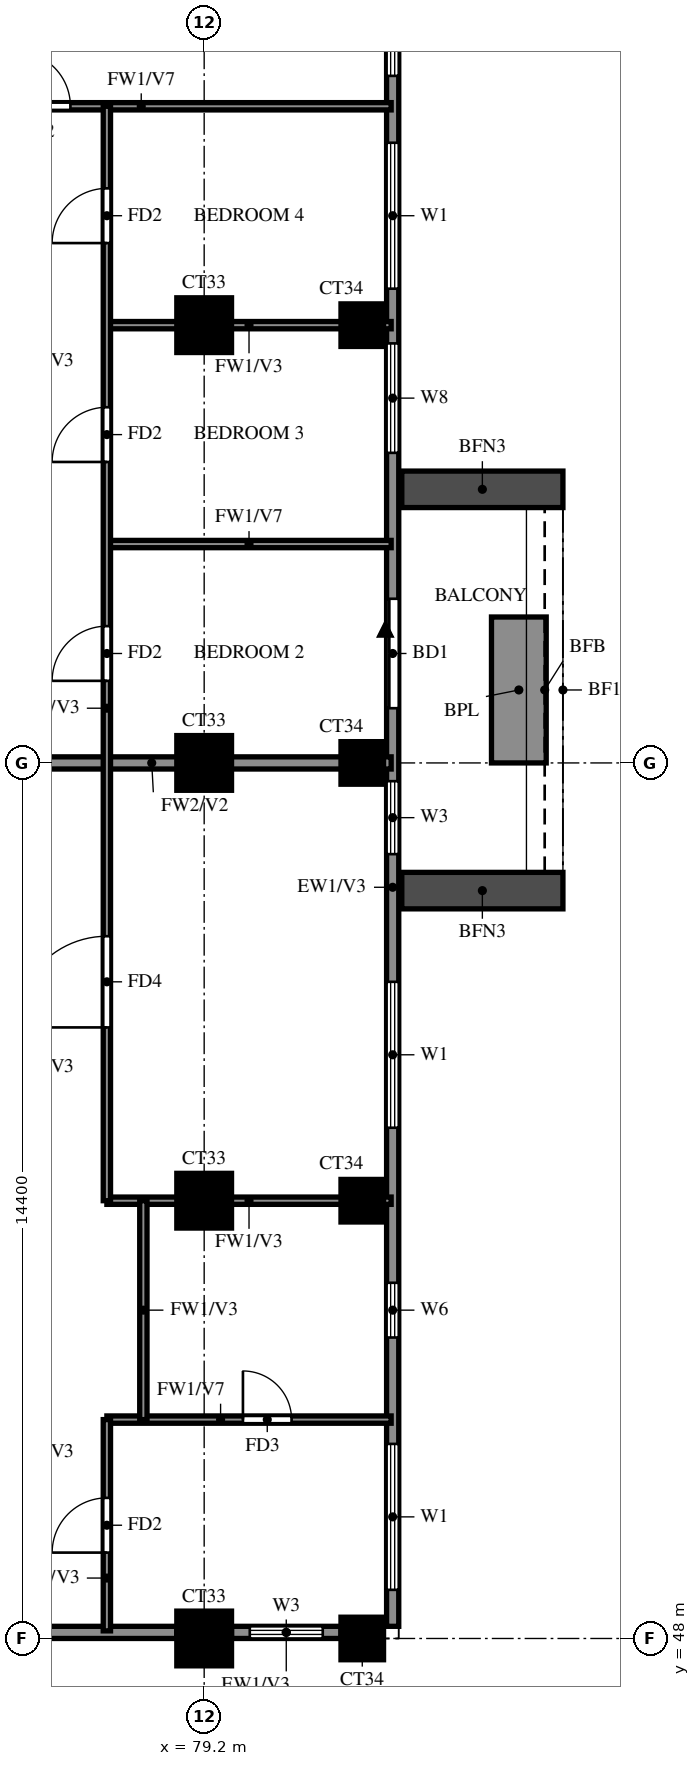
"""IFC4 building model, lengths in metres.
Left out: names, types, materials, properties, quantities, classifications, styles, units other than length and angle.
Written with IfcOpenShell. Run it as: python <this file> out.ifc"""

import sys

from ifc_helpers import new_model, si_unit, direction, frame, frame_2d, origin, origin_2d, place, context, subcontext, project, spatial, rectangle, extrude, source, transform, mapped, element, fill, save


model = new_model("IFC4")
c1 = context("Model", 3, precision=1e-05, world=origin(), true_north=direction((0.0, 1.0)))
c2 = subcontext(c1, "Body", "Model", "MODEL_VIEW")
j1 = project(units=[si_unit("LENGTHUNIT", "METRE"), si_unit("PLANEANGLEUNIT", "RADIAN")], contexts=[c1])
p1 = place(None, origin())
s1 = spatial("IfcSite", under=j1, at=p1, CompositionType="ELEMENT")
p2 = place(p1, origin())
s2 = spatial("IfcBuilding", under=s1, at=p2, CompositionType="ELEMENT")
p3 = place(p2, frame((0.0, 0.0, 225.5)))
s3 = spatial("IfcBuildingStorey", under=s2, at=p3, CompositionType="ELEMENT", Elevation=225.5)
m1 = source(origin(), c2, "Body", "SweptSolid", [
    extrude(rectangle(XDim=0.9, YDim=0.9, at=origin_2d()), origin(), (0.0, 0.0, 1.0), 3.22),
])
p4 = place(p3, frame((79.2, 48.0, 0.0), z_axis=(0.0, 0.0, 1.0), x_axis=(1.0, 0.0, 0.0)))
e1 = element("IfcColumn", 1, at=p4, inside=s3, PredefinedType="COLUMN", context=c2, shape_type="MappedRepresentation", body=[
    mapped(m1, transform((0.0, 0.0, 0.0))),
])
m2 = source(origin(), c2, "Body", "SweptSolid", [
    extrude(rectangle(XDim=0.7, YDim=0.7, at=origin_2d()), origin(), (0.0, 0.0, 1.0), 3.22),
])
p5 = place(p3, frame((81.8, 48.0, 0.0), z_axis=(0.0, 0.0, 1.0), x_axis=(1.0, 0.0, 0.0)))
e2 = element("IfcColumn", 2, at=p5, inside=s3, PredefinedType="COLUMN", context=c2, shape_type="MappedRepresentation", body=[
    mapped(m2, transform((0.0, 0.0, 0.0))),
])
p6 = place(p3, frame((79.2, 55.2, 0.0), z_axis=(0.0, 0.0, 1.0), x_axis=(1.0, 0.0, 0.0)))
e3 = element("IfcColumn", 3, at=p6, inside=s3, PredefinedType="COLUMN", context=c2, shape_type="MappedRepresentation", body=[
    mapped(m1, transform((0.0, 0.0, 0.0))),
])
p7 = place(p3, frame((81.8, 55.2, 0.0), z_axis=(0.0, 0.0, 1.0), x_axis=(1.0, 0.0, 0.0)))
e4 = element("IfcColumn", 4, at=p7, inside=s3, PredefinedType="COLUMN", context=c2, shape_type="MappedRepresentation", body=[
    mapped(m2, transform((0.0, 0.0, 0.0))),
])
p8 = place(p3, frame((79.2, 62.4, 0.0), z_axis=(0.0, 0.0, 1.0), x_axis=(1.0, 0.0, 0.0)))
e5 = element("IfcColumn", 5, at=p8, inside=s3, PredefinedType="COLUMN", context=c2, shape_type="MappedRepresentation", body=[
    mapped(m1, transform((0.0, 0.0, 0.0))),
])
p9 = place(p3, frame((81.8, 62.4, 0.0), z_axis=(0.0, 0.0, 1.0), x_axis=(1.0, 0.0, 0.0)))
e6 = element("IfcColumn", 6, at=p9, inside=s3, PredefinedType="COLUMN", context=c2, shape_type="MappedRepresentation", body=[
    mapped(m2, transform((0.0, 0.0, 0.0))),
])
p10 = place(p3, frame((79.2, 69.6, 0.0), z_axis=(0.0, 0.0, 1.0), x_axis=(1.0, 0.0, 0.0)))
e7 = element("IfcColumn", 7, at=p10, inside=s3, PredefinedType="COLUMN", context=c2, shape_type="MappedRepresentation", body=[
    mapped(m1, transform((0.0, 0.0, 0.0))),
])
p11 = place(p3, frame((81.8, 69.6, 0.0), z_axis=(0.0, 0.0, 1.0), x_axis=(1.0, 0.0, 0.0)))
e8 = element("IfcColumn", 8, at=p11, inside=s3, PredefinedType="COLUMN", context=c2, shape_type="MappedRepresentation", body=[
    mapped(m2, transform((0.0, 0.0, 0.0))),
])
p12 = place(p3, frame((81.907, 39.87, 0.0), z_axis=(0.0, 0.0, 1.0), x_axis=(-0.777936274417, 0.62834318087, 0.0)))
e9 = element("IfcWall", 9, at=p12, inside=s3, PredefinedType="SOLIDWALL", context=c2, shape_type="SweptSolid", body=[
    extrude(rectangle(XDim=13.099, YDim=0.2, at=frame_2d((6.549, 0.0))), origin(), (0.0, 0.0, 1.0), 3.22),
])
p13 = place(p12, frame((9.938, 0.0, 1.5)))
e10 = element("IfcOpeningElement", 10, at=p13, cuts=e9, PredefinedType="OPENING", context=c2, shape_type="SweptSolid", body=[
    extrude(rectangle(XDim=0.9, YDim=0.9, at=frame_2d((0.45, 0.45))), frame((0.0, 0.11, 0.0), z_axis=(0.0, -1.0, 0.0), x_axis=(1.0, 0.0, 0.0)), (0.0, 0.0, 1.0), 0.22),
])
p14 = place(p3, frame((71.987, 48.1, 0.0), z_axis=(0.0, 0.0, 1.0), x_axis=(1.0, 0.0, 0.0)))
e11 = element("IfcWall", 11, at=p14, inside=s3, PredefinedType="SOLIDWALL", context=c2, shape_type="SweptSolid", body=[
    extrude(rectangle(XDim=6.763, YDim=0.2, at=frame_2d((3.381, 0.0))), origin(), (0.0, 0.0, 1.0), 3.22),
])
p15 = place(p14, frame((1.406, 0.0, 1.5)))
e12 = element("IfcOpeningElement", 12, at=p15, cuts=e11, PredefinedType="OPENING", context=c2, shape_type="SweptSolid", body=[
    extrude(rectangle(XDim=0.9, YDim=0.9, at=frame_2d((0.45, 0.45))), frame((0.0, 0.11, 0.0), z_axis=(0.0, -1.0, 0.0), x_axis=(1.0, 0.0, 0.0)), (0.0, 0.0, 1.0), 0.22),
])
p16 = place(p3, frame((79.65, 48.1, 0.0), z_axis=(0.0, 0.0, 1.0), x_axis=(1.0, 0.0, 0.0)))
e13 = element("IfcWall", 13, at=p16, inside=s3, PredefinedType="SOLIDWALL", context=c2, shape_type="SweptSolid", body=[
    extrude(rectangle(XDim=1.8, YDim=0.2, at=frame_2d((0.9, 0.0))), origin(), (0.0, 0.0, 1.0), 3.22),
])
p17 = place(p16, frame((0.3, 0.0, 0.6)))
e14 = element("IfcOpeningElement", 14, at=p17, cuts=e13, PredefinedType="OPENING", context=c2, shape_type="SweptSolid", body=[
    extrude(rectangle(XDim=1.2, YDim=2.4, at=frame_2d((0.6, 1.2))), frame((0.0, 0.11, 0.0), z_axis=(0.0, -1.0, 0.0), x_axis=(1.0, 0.0, 0.0)), (0.0, 0.0, 1.0), 0.22),
])
p18 = place(p3, frame((82.3, 48.2, 0.0), z_axis=(0.0, 0.0, 1.0), x_axis=(0.0, 1.0, 0.0)))
e15 = element("IfcWall", 15, at=p18, inside=s3, PredefinedType="SOLIDWALL", context=c2, shape_type="SweptSolid", body=[
    extrude(rectangle(XDim=28.6, YDim=0.2, at=frame_2d((14.3, 0.0))), origin(), (0.0, 0.0, 1.0), 3.22),
])
p19 = place(p18, frame((15.1, 0.0, 0.0)))
e16 = element("IfcOpeningElement", 16, at=p19, cuts=e15, PredefinedType="OPENING", context=c2, shape_type="SweptSolid", body=[
    extrude(rectangle(XDim=1.8, YDim=2.4, at=frame_2d((0.9, 1.2))), frame((0.0, 0.11, 0.0), z_axis=(0.0, -1.0, 0.0), x_axis=(1.0, 0.0, 0.0)), (0.0, 0.0, 1.0), 0.22),
])
p20 = place(p18, frame((0.6, 0.0, 0.6)))
e17 = element("IfcOpeningElement", 17, at=p20, cuts=e15, PredefinedType="OPENING", context=c2, shape_type="SweptSolid", body=[
    extrude(rectangle(XDim=2.4, YDim=2.4, at=frame_2d((1.2, 1.2))), frame((0.0, 0.11, 0.0), z_axis=(0.0, -1.0, 0.0), x_axis=(1.0, 0.0, 0.0)), (0.0, 0.0, 1.0), 0.22),
])
p21 = place(p18, frame((4.75, 0.0, 1.5)))
e18 = element("IfcOpeningElement", 18, at=p21, cuts=e15, PredefinedType="OPENING", context=c2, shape_type="SweptSolid", body=[
    extrude(rectangle(XDim=0.9, YDim=0.9, at=frame_2d((0.45, 0.45))), frame((0.0, 0.11, 0.0), z_axis=(0.0, -1.0, 0.0), x_axis=(1.0, 0.0, 0.0)), (0.0, 0.0, 1.0), 0.22),
])
p22 = place(p18, frame((8.2, 0.0, 0.6)))
e19 = element("IfcOpeningElement", 19, at=p22, cuts=e15, PredefinedType="OPENING", context=c2, shape_type="SweptSolid", body=[
    extrude(rectangle(XDim=2.4, YDim=2.4, at=frame_2d((1.2, 1.2))), frame((0.0, 0.11, 0.0), z_axis=(0.0, -1.0, 0.0), x_axis=(1.0, 0.0, 0.0)), (0.0, 0.0, 1.0), 0.22),
])
p23 = place(p18, frame((12.7, 0.0, 0.6)))
e20 = element("IfcOpeningElement", 20, at=p23, cuts=e15, PredefinedType="OPENING", context=c2, shape_type="SweptSolid", body=[
    extrude(rectangle(XDim=1.2, YDim=2.4, at=frame_2d((0.6, 1.2))), frame((0.0, 0.11, 0.0), z_axis=(0.0, -1.0, 0.0), x_axis=(1.0, 0.0, 0.0)), (0.0, 0.0, 1.0), 0.22),
])
p24 = place(p18, frame((19.3, 0.0, 0.6)))
e21 = element("IfcOpeningElement", 21, at=p24, cuts=e15, PredefinedType="OPENING", context=c2, shape_type="SweptSolid", body=[
    extrude(rectangle(XDim=1.8, YDim=2.4, at=frame_2d((0.9, 1.2))), frame((0.0, 0.11, 0.0), z_axis=(0.0, -1.0, 0.0), x_axis=(1.0, 0.0, 0.0)), (0.0, 0.0, 1.0), 0.22),
])
p25 = place(p18, frame((22.0, 0.0, 0.6)))
e22 = element("IfcOpeningElement", 22, at=p25, cuts=e15, PredefinedType="OPENING", context=c2, shape_type="SweptSolid", body=[
    extrude(rectangle(XDim=2.4, YDim=2.4, at=frame_2d((1.2, 1.2))), frame((0.0, 0.11, 0.0), z_axis=(0.0, -1.0, 0.0), x_axis=(1.0, 0.0, 0.0)), (0.0, 0.0, 1.0), 0.22),
])
p26 = place(p18, frame((25.5, 0.0, 0.6)))
e23 = element("IfcOpeningElement", 23, at=p26, cuts=e15, PredefinedType="OPENING", context=c2, shape_type="SweptSolid", body=[
    extrude(rectangle(XDim=2.4, YDim=2.4, at=frame_2d((1.2, 1.2))), frame((0.0, 0.11, 0.0), z_axis=(0.0, -1.0, 0.0), x_axis=(1.0, 0.0, 0.0)), (0.0, 0.0, 1.0), 0.22),
])
for number, where, z_axis, x_axis in (
    (24, (82.45, 60.3, 0.0), (0.0, 0.0, 1.0), (1.0, 0.0, 0.0)),
    (25, (82.45, 66.9, 0.0), (0.0, 0.0, 1.0), (1.0, 0.0, 0.0)),
):
    element("IfcWall", number, at=place(p3, frame(where, z_axis=z_axis, x_axis=x_axis)), inside=s3, PredefinedType="SOLIDWALL", context=c2, shape_type="SweptSolid", body=[
        extrude(rectangle(XDim=2.65, YDim=0.6, at=frame_2d((1.325, 0.0))), origin(), (0.0, 0.0, 1.0), 2.85),
    ])
p27 = place(p3, frame((84.375, 62.4, 0.0), z_axis=(0.0, 0.0, 1.0), x_axis=(0.0, 1.0, 0.0)))
e26 = element("IfcWall", 26, at=p27, inside=s3, PredefinedType="SOLIDWALL", context=c2, shape_type="SweptSolid", body=[
    extrude(rectangle(XDim=2.4, YDim=0.9, at=frame_2d((1.2, 0.0))), origin(), (0.0, 0.0, 1.0), 0.9),
])
p28 = place(p3, frame((74.4, 62.4, 0.0), z_axis=(0.0, 0.0, 1.0), x_axis=(1.0, 0.0, 0.0)))
e27 = element("IfcWall", 27, at=p28, inside=s3, PredefinedType="SOLIDWALL", context=c2, shape_type="SweptSolid", body=[
    extrude(rectangle(XDim=7.875, YDim=0.2, at=frame_2d((3.938, 0.0))), origin(), (0.0, 0.0, 1.0), 3.22),
])
p29 = place(p3, frame((77.6, 51.6, 0.0), z_axis=(0.0, 0.0, 1.0), x_axis=(1.0, 0.0, 0.0)))
e28 = element("IfcWall", 28, at=p29, inside=s3, PredefinedType="PARTITIONING", context=c2, shape_type="SweptSolid", body=[
    extrude(rectangle(XDim=4.675, YDim=0.12, at=frame_2d((2.337, 0.0))), origin(), (0.0, 0.0, 1.0), 2.32),
])
p30 = place(p29, frame((2.238, 0.0, 0.0)))
e29 = element("IfcOpeningElement", 29, at=p30, cuts=e28, PredefinedType="OPENING", context=c2, shape_type="SweptSolid", body=[
    extrude(rectangle(XDim=0.8, YDim=2.1, at=frame_2d((0.4, 1.05))), frame((0.0, 0.07, 0.0), z_axis=(0.0, -1.0, 0.0), x_axis=(1.0, 0.0, 0.0)), (0.0, 0.0, 1.0), 0.14),
])
p31 = place(p3, frame((77.6, 55.2, 0.0), z_axis=(0.0, 0.0, 1.0), x_axis=(1.0, 0.0, 0.0)))
e30 = element("IfcWall", 30, at=p31, inside=s3, PredefinedType="PARTITIONING", context=c2, shape_type="SweptSolid", body=[
    extrude(rectangle(XDim=4.675, YDim=0.12, at=frame_2d((2.337, 0.0))), origin(), (0.0, 0.0, 1.0), 3.22),
])
p32 = place(p3, frame((77.6, 66.0, 0.0), z_axis=(0.0, 0.0, 1.0), x_axis=(1.0, 0.0, 0.0)))
e31 = element("IfcWall", 31, at=p32, inside=s3, PredefinedType="PARTITIONING", context=c2, shape_type="SweptSolid", body=[
    extrude(rectangle(XDim=4.675, YDim=0.12, at=frame_2d((2.337, 0.0))), origin(), (0.0, 0.0, 1.0), 2.32),
])
p33 = place(p3, frame((77.6, 69.6, 0.0), z_axis=(0.0, 0.0, 1.0), x_axis=(1.0, 0.0, 0.0)))
e32 = element("IfcWall", 32, at=p33, inside=s3, PredefinedType="PARTITIONING", context=c2, shape_type="SweptSolid", body=[
    extrude(rectangle(XDim=4.675, YDim=0.12, at=frame_2d((2.337, 0.0))), origin(), (0.0, 0.0, 1.0), 3.22),
])
p34 = place(p3, frame((72.0, 73.2, 0.0), z_axis=(0.0, 0.0, 1.0), x_axis=(1.0, 0.0, 0.0)))
e33 = element("IfcWall", 33, at=p34, inside=s3, PredefinedType="PARTITIONING", context=c2, shape_type="SweptSolid", body=[
    extrude(rectangle(XDim=10.275, YDim=0.12, at=frame_2d((5.137, 0.0))), origin(), (0.0, 0.0, 1.0), 2.32),
])
p35 = place(p34, frame((4.1, 0.0, 0.0)))
e34 = element("IfcOpeningElement", 34, at=p35, cuts=e33, PredefinedType="OPENING", context=c2, shape_type="SweptSolid", body=[
    extrude(rectangle(XDim=0.9, YDim=2.1, at=frame_2d((0.45, 1.05))), frame((0.0, 0.07, 0.0), z_axis=(0.0, -1.0, 0.0), x_axis=(1.0, 0.0, 0.0)), (0.0, 0.0, 1.0), 0.14),
])
p36 = place(p3, frame((77.6, 48.125, 0.0), z_axis=(0.0, 0.0, 1.0), x_axis=(0.0, 1.0, 0.0)))
e35 = element("IfcWall", 35, at=p36, inside=s3, PredefinedType="PARTITIONING", context=c2, shape_type="SweptSolid", body=[
    extrude(rectangle(XDim=3.475, YDim=0.12, at=frame_2d((1.738, 0.0))), origin(), (0.0, 0.0, 1.0), 3.22),
])
p37 = place(p36, frame((1.288, 0.0, 0.0)))
e36 = element("IfcOpeningElement", 36, at=p37, cuts=e35, PredefinedType="OPENING", context=c2, shape_type="SweptSolid", body=[
    extrude(rectangle(XDim=0.9, YDim=2.1, at=frame_2d((0.45, 1.05))), frame((0.0, 0.07, 0.0), z_axis=(0.0, -1.0, 0.0), x_axis=(1.0, 0.0, 0.0)), (0.0, 0.0, 1.0), 0.14),
])
p38 = place(p3, frame((77.6, 55.2, 0.0), z_axis=(0.0, 0.0, 1.0), x_axis=(0.0, 1.0, 0.0)))
e37 = element("IfcWall", 37, at=p38, inside=s3, PredefinedType="PARTITIONING", context=c2, shape_type="SweptSolid", body=[
    extrude(rectangle(XDim=18.0, YDim=0.12, at=frame_2d((9.0, 0.0))), origin(), (0.0, 0.0, 1.0), 3.22),
])
p39 = place(p38, frame((2.85, 0.0, 0.0)))
e38 = element("IfcOpeningElement", 38, at=p39, cuts=e37, PredefinedType="OPENING", context=c2, shape_type="SweptSolid", body=[
    extrude(rectangle(XDim=1.5, YDim=2.1, at=frame_2d((0.75, 1.05))), frame((0.0, 0.07, 0.0), z_axis=(0.0, -1.0, 0.0), x_axis=(1.0, 0.0, 0.0)), (0.0, 0.0, 1.0), 0.14),
])
p40 = place(p38, frame((8.55, 0.0, 0.0)))
e39 = element("IfcOpeningElement", 39, at=p40, cuts=e37, PredefinedType="OPENING", context=c2, shape_type="SweptSolid", body=[
    extrude(rectangle(XDim=0.9, YDim=2.1, at=frame_2d((0.45, 1.05))), frame((0.0, 0.07, 0.0), z_axis=(0.0, -1.0, 0.0), x_axis=(1.0, 0.0, 0.0)), (0.0, 0.0, 1.0), 0.14),
])
p41 = place(p38, frame((12.15, 0.0, 0.0)))
e40 = element("IfcOpeningElement", 40, at=p41, cuts=e37, PredefinedType="OPENING", context=c2, shape_type="SweptSolid", body=[
    extrude(rectangle(XDim=0.9, YDim=2.1, at=frame_2d((0.45, 1.05))), frame((0.0, 0.07, 0.0), z_axis=(0.0, -1.0, 0.0), x_axis=(1.0, 0.0, 0.0)), (0.0, 0.0, 1.0), 0.14),
])
p42 = place(p38, frame((15.75, 0.0, 0.0)))
e41 = element("IfcOpeningElement", 41, at=p42, cuts=e37, PredefinedType="OPENING", context=c2, shape_type="SweptSolid", body=[
    extrude(rectangle(XDim=0.9, YDim=2.1, at=frame_2d((0.45, 1.05))), frame((0.0, 0.07, 0.0), z_axis=(0.0, -1.0, 0.0), x_axis=(1.0, 0.0, 0.0)), (0.0, 0.0, 1.0), 0.14),
])
p43 = place(p3, frame((78.2, 51.6, 0.0), z_axis=(0.0, 0.0, 1.0), x_axis=(0.0, 1.0, 0.0)))
e42 = element("IfcWall", 42, at=p43, inside=s3, PredefinedType="PARTITIONING", context=c2, shape_type="SweptSolid", body=[
    extrude(rectangle(XDim=3.6, YDim=0.12, at=frame_2d((1.8, 0.0))), origin(), (0.0, 0.0, 1.0), 3.22),
])
p44 = place(p17, origin())
e43 = element("IfcWindow", 43, at=p44, inside=s3, PartitioningType="SINGLE_PANEL", PredefinedType="WINDOW", context=c2, shape_type="SweptSolid", body=[
    extrude(rectangle(XDim=1.2, YDim=2.4, at=frame_2d((0.6, 1.2))), frame((0.0, 0.03, 0.0), z_axis=(0.0, -1.0, 0.0), x_axis=(1.0, 0.0, 0.0)), (0.0, 0.0, 1.0), 0.06),
])
fill(e14, e43)
p45 = place(p19, origin())
e44 = element("IfcDoor", 44, at=p45, inside=s3, OperationType="DOUBLE_DOOR_SLIDING", PredefinedType="DOOR", context=c2, shape_type="SweptSolid", body=[
    extrude(rectangle(XDim=1.8, YDim=2.4, at=frame_2d((0.9, 1.2))), frame((0.0, 0.025, 0.0), z_axis=(0.0, -1.0, 0.0), x_axis=(1.0, 0.0, 0.0)), (0.0, 0.0, 1.0), 0.05),
])
fill(e16, e44)
p46 = place(p20, origin())
e45 = element("IfcWindow", 45, at=p46, inside=s3, PartitioningType="DOUBLE_PANEL_VERTICAL", PredefinedType="WINDOW", context=c2, shape_type="SweptSolid", body=[
    extrude(rectangle(XDim=2.4, YDim=2.4, at=frame_2d((1.2, 1.2))), frame((0.0, 0.03, 0.0), z_axis=(0.0, -1.0, 0.0), x_axis=(1.0, 0.0, 0.0)), (0.0, 0.0, 1.0), 0.06),
])
fill(e17, e45)
p47 = place(p21, origin())
e46 = element("IfcWindow", 46, at=p47, inside=s3, PartitioningType="SINGLE_PANEL", PredefinedType="WINDOW", context=c2, shape_type="SweptSolid", body=[
    extrude(rectangle(XDim=0.9, YDim=0.9, at=frame_2d((0.45, 0.45))), frame((0.0, 0.03, 0.0), z_axis=(0.0, -1.0, 0.0), x_axis=(1.0, 0.0, 0.0)), (0.0, 0.0, 1.0), 0.06),
])
fill(e18, e46)
p48 = place(p22, origin())
e47 = element("IfcWindow", 47, at=p48, inside=s3, PartitioningType="DOUBLE_PANEL_VERTICAL", PredefinedType="WINDOW", context=c2, shape_type="SweptSolid", body=[
    extrude(rectangle(XDim=2.4, YDim=2.4, at=frame_2d((1.2, 1.2))), frame((0.0, 0.03, 0.0), z_axis=(0.0, -1.0, 0.0), x_axis=(1.0, 0.0, 0.0)), (0.0, 0.0, 1.0), 0.06),
])
fill(e19, e47)
p49 = place(p23, origin())
e48 = element("IfcWindow", 48, at=p49, inside=s3, PartitioningType="SINGLE_PANEL", PredefinedType="WINDOW", context=c2, shape_type="SweptSolid", body=[
    extrude(rectangle(XDim=1.2, YDim=2.4, at=frame_2d((0.6, 1.2))), frame((0.0, 0.03, 0.0), z_axis=(0.0, -1.0, 0.0), x_axis=(1.0, 0.0, 0.0)), (0.0, 0.0, 1.0), 0.06),
])
fill(e20, e48)
p50 = place(p24, origin())
e49 = element("IfcWindow", 49, at=p50, inside=s3, PartitioningType="DOUBLE_PANEL_VERTICAL", PredefinedType="WINDOW", context=c2, shape_type="SweptSolid", body=[
    extrude(rectangle(XDim=1.8, YDim=2.4, at=frame_2d((0.9, 1.2))), frame((0.0, 0.03, 0.0), z_axis=(0.0, -1.0, 0.0), x_axis=(1.0, 0.0, 0.0)), (0.0, 0.0, 1.0), 0.06),
])
fill(e21, e49)
p51 = place(p25, origin())
e50 = element("IfcWindow", 50, at=p51, inside=s3, PartitioningType="DOUBLE_PANEL_VERTICAL", PredefinedType="WINDOW", context=c2, shape_type="SweptSolid", body=[
    extrude(rectangle(XDim=2.4, YDim=2.4, at=frame_2d((1.2, 1.2))), frame((0.0, 0.03, 0.0), z_axis=(0.0, -1.0, 0.0), x_axis=(1.0, 0.0, 0.0)), (0.0, 0.0, 1.0), 0.06),
])
fill(e22, e50)
p52 = place(p26, origin())
e51 = element("IfcWindow", 51, at=p52, inside=s3, PartitioningType="DOUBLE_PANEL_VERTICAL", PredefinedType="WINDOW", context=c2, shape_type="SweptSolid", body=[
    extrude(rectangle(XDim=2.4, YDim=2.4, at=frame_2d((1.2, 1.2))), frame((0.0, 0.03, 0.0), z_axis=(0.0, -1.0, 0.0), x_axis=(1.0, 0.0, 0.0)), (0.0, 0.0, 1.0), 0.06),
])
fill(e23, e51)
p53 = place(p37, origin())
e52 = element("IfcDoor", 52, at=p53, inside=s3, OperationType="SINGLE_SWING_LEFT", PredefinedType="DOOR", context=c2, shape_type="SweptSolid", body=[
    extrude(rectangle(XDim=0.9, YDim=2.1, at=frame_2d((0.45, 1.05))), frame((0.0, 0.025, 0.0), z_axis=(0.0, -1.0, 0.0), x_axis=(1.0, 0.0, 0.0)), (0.0, 0.0, 1.0), 0.05),
])
fill(e36, e52)
p54 = place(p30, origin())
e53 = element("IfcDoor", 53, at=p54, inside=s3, OperationType="SINGLE_SWING_LEFT", PredefinedType="DOOR", context=c2, shape_type="SweptSolid", body=[
    extrude(rectangle(XDim=0.8, YDim=2.1, at=frame_2d((0.4, 1.05))), frame((0.0, 0.025, 0.0), z_axis=(0.0, -1.0, 0.0), x_axis=(1.0, 0.0, 0.0)), (0.0, 0.0, 1.0), 0.05),
])
fill(e29, e53)
p55 = place(p39, origin())
e54 = element("IfcDoor", 54, at=p55, inside=s3, OperationType="SINGLE_SWING_RIGHT", PredefinedType="DOOR", context=c2, shape_type="SweptSolid", body=[
    extrude(rectangle(XDim=1.5, YDim=2.1, at=frame_2d((0.75, 1.05))), frame((0.0, 0.025, 0.0), z_axis=(0.0, -1.0, 0.0), x_axis=(1.0, 0.0, 0.0)), (0.0, 0.0, 1.0), 0.05),
])
fill(e38, e54)
p56 = place(p40, origin())
e55 = element("IfcDoor", 55, at=p56, inside=s3, OperationType="SINGLE_SWING_RIGHT", PredefinedType="DOOR", context=c2, shape_type="SweptSolid", body=[
    extrude(rectangle(XDim=0.9, YDim=2.1, at=frame_2d((0.45, 1.05))), frame((0.0, 0.025, 0.0), z_axis=(0.0, -1.0, 0.0), x_axis=(1.0, 0.0, 0.0)), (0.0, 0.0, 1.0), 0.05),
])
fill(e39, e55)
p57 = place(p41, origin())
e56 = element("IfcDoor", 56, at=p57, inside=s3, OperationType="SINGLE_SWING_LEFT", PredefinedType="DOOR", context=c2, shape_type="SweptSolid", body=[
    extrude(rectangle(XDim=0.9, YDim=2.1, at=frame_2d((0.45, 1.05))), frame((0.0, 0.025, 0.0), z_axis=(0.0, -1.0, 0.0), x_axis=(1.0, 0.0, 0.0)), (0.0, 0.0, 1.0), 0.05),
])
fill(e40, e56)
p58 = place(p42, origin())
e57 = element("IfcDoor", 57, at=p58, inside=s3, OperationType="SINGLE_SWING_LEFT", PredefinedType="DOOR", context=c2, shape_type="SweptSolid", body=[
    extrude(rectangle(XDim=0.9, YDim=2.1, at=frame_2d((0.45, 1.05))), frame((0.0, 0.025, 0.0), z_axis=(0.0, -1.0, 0.0), x_axis=(1.0, 0.0, 0.0)), (0.0, 0.0, 1.0), 0.05),
])
fill(e41, e57)
p59 = place(p35, origin())
e58 = element("IfcDoor", 58, at=p59, inside=s3, OperationType="SINGLE_SWING_RIGHT", PredefinedType="DOOR", context=c2, shape_type="SweptSolid", body=[
    extrude(rectangle(XDim=0.9, YDim=2.1, at=frame_2d((0.45, 1.05))), frame((0.0, 0.025, 0.0), z_axis=(0.0, -1.0, 0.0), x_axis=(1.0, 0.0, 0.0)), (0.0, 0.0, 1.0), 0.05),
])
fill(e34, e58)
save(model, sys.argv[1])
